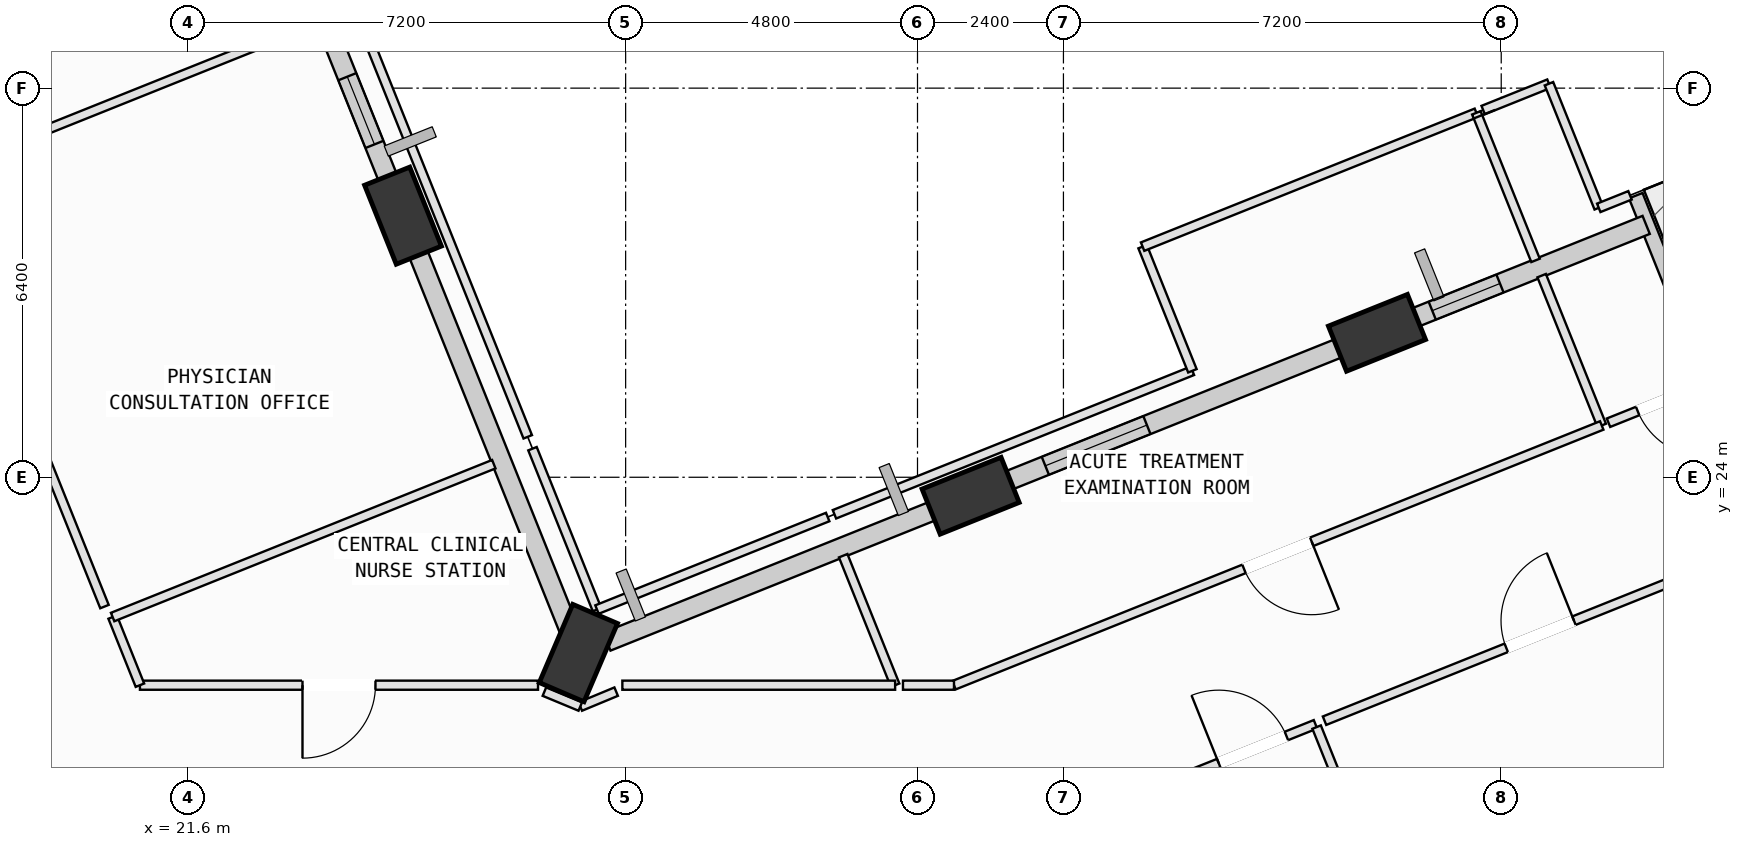
"""IFC4 building model, lengths in metres.
Left out: names, types, materials, properties, quantities, classifications, styles, units other than length and angle.
Written with IfcOpenShell. Run it as: python <this file> out.ifc"""

import sys

from ifc_helpers import new_model, si_unit, direction, frame, frame_2d, origin, origin_2d, place, context, subcontext, project, spatial, rectangle, extrude, element, fill, save


model = new_model("IFC4")
c1 = context("Model", 3, precision=1e-05, world=origin(), true_north=direction((0.0, 1.0)))
c2 = subcontext(c1, "Body", "Model", "MODEL_VIEW")
j1 = project(units=[si_unit("LENGTHUNIT", "METRE"), si_unit("PLANEANGLEUNIT", "RADIAN")], contexts=[c1])
p1 = place(None, origin())
s1 = spatial("IfcSite", under=j1, at=p1, CompositionType="ELEMENT")
p2 = place(p1, origin())
s2 = spatial("IfcBuilding", under=s1, at=p2, CompositionType="ELEMENT")
p3 = place(p2, frame((0.0, 0.0, 116.4)))
s3 = spatial("IfcBuildingStorey", under=s2, at=p3, CompositionType="ELEMENT", Elevation=116.4)
p4 = place(p3, frame((41.156, 26.375, 0.002), z_axis=(-0.006777640232, 0.031262628818, 0.999488224859), x_axis=(-0.828274350802, -0.560196266994, 0.011905555365)))
e1 = element("IfcColumn", 1, at=p4, inside=s3, PredefinedType="COLUMN", context=c2, shape_type="SweptSolid", body=[
    extrude(rectangle(XDim=1.4, YDim=0.8, at=origin_2d()), origin(), (0.0, 0.0, 1.0), 3.998),
])
p5 = place(p3, frame((34.474, 23.696, 0.002), z_axis=(0.004581752639, 0.003665402111, 0.999982786037), x_axis=(-0.870434976609, 0.492278562101, 0.002183756462)))
e2 = element("IfcColumn", 2, at=p5, inside=s3, PredefinedType="COLUMN", context=c2, shape_type="SweptSolid", body=[
    extrude(rectangle(XDim=1.4, YDim=0.8, at=origin_2d()), origin(), (0.0, 0.0, 1.0), 3.996),
])
p6 = place(p3, frame((28.023, 21.109, 0.002), z_axis=(0.015511177692, -0.022961428395, 0.999616014364), x_axis=(-0.188731248776, 0.981698205068, 0.025478420325)))
e3 = element("IfcColumn", 3, at=p6, inside=s3, PredefinedType="COLUMN", context=c2, shape_type="SweptSolid", body=[
    extrude(rectangle(XDim=1.4, YDim=0.8, at=origin_2d()), origin(), (0.0, 0.0, 1.0), 3.998),
])
p7 = place(p3, frame((25.139, 28.302, 0.002), z_axis=(-0.014223979667, -0.035163142868, 0.99928035695), x_axis=(0.002786671308, 0.999376185068, 0.035206181014)))
e4 = element("IfcColumn", 4, at=p7, inside=s3, PredefinedType="COLUMN", context=c2, shape_type="SweptSolid", body=[
    extrude(rectangle(XDim=1.4, YDim=0.8, at=origin_2d()), origin(), (0.0, 0.0, 1.0), 3.999),
])
p8 = place(p3, frame((45.413, 28.632, 0.0), z_axis=(0.0, 0.0, 1.0), x_axis=(0.372181923491, -0.928159800803, 0.0)))
e5 = element("IfcWall", 5, at=p8, inside=s3, PredefinedType="SOLIDWALL", context=c2, shape_type="SweptSolid", body=[
    extrude(rectangle(XDim=2.5, YDim=0.24, at=frame_2d((1.25, 0.0))), origin(), (0.0, 0.0, 1.0), 3.165),
])
p9 = place(p3, frame((41.623, 26.563, 0.0), z_axis=(0.0, 0.0, 1.0), x_axis=(0.928156727061, 0.372189588801, 0.0)))
e6 = element("IfcWall", 6, at=p9, inside=s3, PredefinedType="SOLIDWALL", context=c2, shape_type="SweptSolid", body=[
    extrude(rectangle(XDim=4.267, YDim=0.32, at=frame_2d((2.134, 0.0))), origin(), (0.0, 0.0, 1.0), 3.145),
])
p10 = place(p9, frame((0.477, 0.0, 0.75)))
e7 = element("IfcOpeningElement", 7, at=p10, cuts=e6, PredefinedType="OPENING", context=c2, shape_type="SweptSolid", body=[
    extrude(rectangle(XDim=1.2, YDim=1.75, at=frame_2d((0.6, 0.875))), frame((0.0, 0.17, 0.0), z_axis=(0.0, -1.0, 0.0), x_axis=(1.0, 0.0, 0.0)), (0.0, 0.0, 1.0), 0.34),
])
p11 = place(p3, frame((34.945, 23.885, 0.0), z_axis=(0.0, 0.0, 1.0), x_axis=(0.928167331389, 0.372163142912, 0.0)))
e8 = element("IfcWall", 8, at=p11, inside=s3, PredefinedType="SOLIDWALL", context=c2, shape_type="SweptSolid", body=[
    extrude(rectangle(XDim=6.211, YDim=0.32, at=frame_2d((3.105, 0.0))), origin(), (0.0, 0.0, 1.0), 3.165),
])
p12 = place(p11, frame((0.816, 0.0, 0.75)))
e9 = element("IfcOpeningElement", 9, at=p12, cuts=e8, PredefinedType="OPENING", context=c2, shape_type="SweptSolid", body=[
    extrude(rectangle(XDim=1.8, YDim=2.05, at=frame_2d((0.9, 1.025))), frame((0.0, 0.17, 0.0), z_axis=(0.0, -1.0, 0.0), x_axis=(1.0, 0.0, 0.0)), (0.0, 0.0, 1.0), 0.34),
])
p13 = place(p3, frame((28.492, 21.297, 0.0), z_axis=(0.0, 0.0, 1.0), x_axis=(0.928154282778, 0.372195684232, 0.0)))
e10 = element("IfcWall", 10, at=p13, inside=s3, PredefinedType="SOLIDWALL", context=c2, shape_type="SweptSolid", body=[
    extrude(rectangle(XDim=5.96, YDim=0.32, at=frame_2d((2.98, 0.0))), origin(), (0.0, 0.0, 1.0), 3.165),
])
p14 = place(p3, frame((25.343, 27.794, 0.0), z_axis=(0.0, 0.0, 1.0), x_axis=(0.37216889436, -0.928165025236, 0.0)))
e11 = element("IfcWall", 11, at=p14, inside=s3, PredefinedType="SOLIDWALL", context=c2, shape_type="SweptSolid", body=[
    extrude(rectangle(XDim=6.76, YDim=0.32, at=frame_2d((3.38, 0.0))), origin(), (0.0, 0.0, 1.0), 3.165),
])
p15 = place(p3, frame((22.659, 34.485, 0.0), z_axis=(0.0, 0.0, 1.0), x_axis=(0.372175226891, -0.928162486038, 0.0)))
e12 = element("IfcWall", 12, at=p15, inside=s3, PredefinedType="SOLIDWALL", context=c2, shape_type="SweptSolid", body=[
    extrude(rectangle(XDim=6.223, YDim=0.32, at=frame_2d((3.111, 0.0))), origin(), (0.0, 0.0, 1.0), 3.165),
])
p16 = place(p15, frame((4.199, 0.0, 0.75)))
e13 = element("IfcOpeningElement", 13, at=p16, cuts=e12, PredefinedType="OPENING", context=c2, shape_type="SweptSolid", body=[
    extrude(rectangle(XDim=1.2, YDim=1.75, at=frame_2d((0.6, 0.875))), frame((0.0, 0.17, 0.0), z_axis=(0.0, -1.0, 0.0), x_axis=(1.0, 0.0, 0.0)), (0.0, 0.0, 1.0), 0.34),
])
p17 = place(p15, frame((0.561, 0.0, 0.75)))
e14 = element("IfcOpeningElement", 14, at=p17, cuts=e12, PredefinedType="OPENING", context=c2, shape_type="SweptSolid", body=[
    extrude(rectangle(XDim=1.2, YDim=1.75, at=frame_2d((0.6, 0.875))), frame((0.0, 0.17, 0.0), z_axis=(0.0, -1.0, 0.0), x_axis=(1.0, 0.0, 0.0)), (0.0, 0.0, 1.0), 0.34),
])
p18 = place(p3, frame((38.076, 19.107, 0.0), z_axis=(0.0, 0.0, 1.0), x_axis=(0.928098589705, 0.372334537463, 0.0)))
e15 = element("IfcWall", 15, at=p18, inside=s3, PredefinedType="PARTITIONING", context=c2, shape_type="SweptSolid", body=[
    extrude(rectangle(XDim=2.229, YDim=0.15, at=frame_2d((1.115, 0.0))), origin(), (0.0, 0.0, 1.0), 2.945),
])
p19 = place(p18, frame((0.515, 0.0, 0.0)))
e16 = element("IfcOpeningElement", 16, at=p19, cuts=e15, PredefinedType="OPENING", context=c2, shape_type="SweptSolid", body=[
    extrude(rectangle(XDim=1.2, YDim=2.15, at=frame_2d((0.6, 1.075))), frame((0.0, 0.085, 0.0), z_axis=(0.0, -1.0, 0.0), x_axis=(1.0, 0.0, 0.0)), (0.0, 0.0, 1.0), 0.17),
])
p20 = place(p3, frame((40.164, 19.891, 0.0), z_axis=(0.0, 0.0, 1.0), x_axis=(0.372132851531, -0.928179476616, 0.0)))
e17 = element("IfcWall", 17, at=p20, inside=s3, PredefinedType="PARTITIONING", context=c2, shape_type="SweptSolid", body=[
    extrude(rectangle(XDim=15.481, YDim=0.15, at=frame_2d((7.74, 0.0))), origin(), (0.0, 0.0, 1.0), 3.78),
])
p21 = place(p3, frame((40.294, 19.996, 0.0), z_axis=(0.0, 0.0, 1.0), x_axis=(0.928134709593, 0.372244490689, 0.0)))
e18 = element("IfcWall", 18, at=p21, inside=s3, PredefinedType="PARTITIONING", context=c2, shape_type="SweptSolid", body=[
    extrude(rectangle(XDim=7.64, YDim=0.15, at=frame_2d((3.82, 0.0))), origin(), (0.0, 0.0, 1.0), 3.78),
])
p22 = place(p21, frame((3.22, 0.0, 0.0)))
e19 = element("IfcOpeningElement", 19, at=p22, cuts=e18, PredefinedType="OPENING", context=c2, shape_type="SweptSolid", body=[
    extrude(rectangle(XDim=1.2, YDim=2.15, at=frame_2d((0.6, 1.075))), frame((0.0, 0.085, 0.0), z_axis=(0.0, -1.0, 0.0), x_axis=(1.0, 0.0, 0.0)), (0.0, 0.0, 1.0), 0.17),
])
p23 = place(p3, frame((28.644, 20.474, 0.0), z_axis=(0.0, 0.0, 1.0), x_axis=(-0.923494633817, -0.383611341478, 0.0)))
e20 = element("IfcWall", 20, at=p23, inside=s3, PredefinedType="PARTITIONING", context=c2, shape_type="SweptSolid", body=[
    extrude(rectangle(XDim=0.639, YDim=0.15, at=frame_2d((0.319, 0.0))), origin(), (0.0, 0.0, 1.0), 3.78),
])
p24 = place(p3, frame((28.054, 20.229, 0.0), z_axis=(0.0, 0.0, 1.0), x_axis=(-0.923438377602, 0.38374674301, 0.0)))
e21 = element("IfcWall", 21, at=p24, inside=s3, PredefinedType="PARTITIONING", context=c2, shape_type="SweptSolid", body=[
    extrude(rectangle(XDim=0.639, YDim=0.15, at=frame_2d((0.319, 0.0))), origin(), (0.0, 0.0, 1.0), 3.78),
])
p25 = place(p3, frame((27.359, 20.58, 0.0), z_axis=(0.0, 0.0, 1.0), x_axis=(-1.0, 0.0, 0.0)))
e22 = element("IfcWall", 22, at=p25, inside=s3, PredefinedType="PARTITIONING", context=c2, shape_type="SweptSolid", body=[
    extrude(rectangle(XDim=6.547, YDim=0.15, at=frame_2d((3.273, 0.0))), origin(), (0.0, 0.0, 1.0), 3.78),
])
p26 = place(p25, frame((2.674, 0.0, 0.0)))
e23 = element("IfcOpeningElement", 23, at=p26, cuts=e22, PredefinedType="OPENING", context=c2, shape_type="SweptSolid", body=[
    extrude(rectangle(XDim=1.2, YDim=2.15, at=frame_2d((0.6, 1.075))), frame((0.0, 0.085, 0.0), z_axis=(0.0, -1.0, 0.0), x_axis=(1.0, 0.0, 0.0)), (0.0, 0.0, 1.0), 0.17),
])
p27 = place(p3, frame((20.812, 20.58, 0.0), z_axis=(0.0, 0.0, 1.0), x_axis=(-0.371843836614, 0.928295298476, 0.0)))
e24 = element("IfcWall", 24, at=p27, inside=s3, PredefinedType="PARTITIONING", context=c2, shape_type="SweptSolid", body=[
    extrude(rectangle(XDim=1.208, YDim=0.15, at=frame_2d((0.604, 0.0))), origin(), (0.0, 0.0, 1.0), 3.78),
])
p28 = place(p3, frame((20.363, 21.701, 0.0), z_axis=(0.0, 0.0, 1.0), x_axis=(0.928142281739, 0.372225610147, 0.0)))
e25 = element("IfcWall", 25, at=p28, inside=s3, PredefinedType="PARTITIONING", context=c2, shape_type="SweptSolid", body=[
    extrude(rectangle(XDim=6.754, YDim=0.15, at=frame_2d((3.377, 0.0))), origin(), (0.0, 0.0, 1.0), 3.78),
])
p29 = place(p3, frame((27.268, 24.47, 0.0), z_axis=(0.0, 0.0, 1.0), x_axis=(0.372187869695, -0.928157416418, 0.0)))
e26 = element("IfcWall", 26, at=p29, inside=s3, PredefinedType="PARTITIONING", context=c2, shape_type="SweptSolid", body=[
    extrude(rectangle(XDim=2.851, YDim=0.15, at=frame_2d((1.425, 0.0))), origin(), (0.0, 0.0, 1.0), 3.78),
])
p30 = place(p3, frame((28.329, 21.824, 0.0), z_axis=(0.0, 0.0, 1.0), x_axis=(0.928105529855, 0.372317237652, 0.0)))
e27 = element("IfcWall", 27, at=p30, inside=s3, PredefinedType="PARTITIONING", context=c2, shape_type="SweptSolid", body=[
    extrude(rectangle(XDim=4.088, YDim=0.15, at=frame_2d((2.044, 0.0))), origin(), (0.0, 0.0, 1.0), 3.78),
])
p31 = place(p3, frame((32.378, 22.71, 0.0), z_axis=(0.0, 0.0, 1.0), x_axis=(0.37216097697, -0.928168199854, 0.0)))
e28 = element("IfcWall", 28, at=p31, inside=s3, PredefinedType="PARTITIONING", context=c2, shape_type="SweptSolid", body=[
    extrude(rectangle(XDim=2.295, YDim=0.15, at=frame_2d((1.147, 0.0))), origin(), (0.0, 0.0, 1.0), 3.78),
])
p32 = place(p3, frame((33.232, 20.58, 0.0), z_axis=(0.0, 0.0, 1.0), x_axis=(-1.0, 0.0, 0.0)))
e29 = element("IfcWall", 29, at=p32, inside=s3, PredefinedType="PARTITIONING", context=c2, shape_type="SweptSolid", body=[
    extrude(rectangle(XDim=4.486, YDim=0.15, at=frame_2d((2.243, 0.0))), origin(), (0.0, 0.0, 1.0), 3.78),
])
p33 = place(p3, frame((32.234, 23.391, 0.0), z_axis=(0.0, 0.0, 1.0), x_axis=(0.928205670009, 0.37206751291, 0.0)))
e30 = element("IfcWall", 30, at=p33, inside=s3, PredefinedType="PARTITIONING", context=c2, shape_type="SweptSolid", body=[
    extrude(rectangle(XDim=6.343, YDim=0.15, at=frame_2d((3.171, 0.0))), origin(), (0.0, 0.0, 1.0), 3.78),
])
p34 = place(p3, frame((38.121, 25.751, 0.0), z_axis=(0.0, 0.0, 1.0), x_axis=(-0.372289706469, 0.928116573743, 0.0)))
e31 = element("IfcWall", 31, at=p34, inside=s3, PredefinedType="PARTITIONING", context=c2, shape_type="SweptSolid", body=[
    extrude(rectangle(XDim=2.2, YDim=0.15, at=frame_2d((1.1, 0.0))), origin(), (0.0, 0.0, 1.0), 3.78),
])
p35 = place(p3, frame((37.302, 27.793, 0.0), z_axis=(0.0, 0.0, 1.0), x_axis=(0.92816603235, 0.372166382673, 0.0)))
e32 = element("IfcWall", 32, at=p35, inside=s3, PredefinedType="PARTITIONING", context=c2, shape_type="SweptSolid", body=[
    extrude(rectangle(XDim=5.914, YDim=0.15, at=frame_2d((2.957, 0.0))), origin(), (0.0, 0.0, 1.0), 3.78),
])
p36 = place(p3, frame((42.791, 29.994, 0.0), z_axis=(0.0, 0.0, 1.0), x_axis=(0.372082805239, -0.928199539994, 0.0)))
e33 = element("IfcWall", 33, at=p36, inside=s3, PredefinedType="PARTITIONING", context=c2, shape_type="SweptSolid", body=[
    extrude(rectangle(XDim=2.615, YDim=0.15, at=frame_2d((1.307, 0.0))), origin(), (0.0, 0.0, 1.0), 3.78),
])
p37 = place(p3, frame((43.865, 27.316, 0.0), z_axis=(0.0, 0.0, 1.0), x_axis=(0.372199229905, -0.928152860933, 0.0)))
e34 = element("IfcWall", 34, at=p37, inside=s3, PredefinedType="PARTITIONING", context=c2, shape_type="SweptSolid", body=[
    extrude(rectangle(XDim=2.655, YDim=0.15, at=frame_2d((1.327, 0.0))), origin(), (0.0, 0.0, 1.0), 3.78),
])
p38 = place(p3, frame((44.853, 24.852, 0.0), z_axis=(0.0, 0.0, 1.0), x_axis=(-0.928153610166, -0.372197361537, 0.0)))
e35 = element("IfcWall", 35, at=p38, inside=s3, PredefinedType="PARTITIONING", context=c2, shape_type="SweptSolid", body=[
    extrude(rectangle(XDim=11.478, YDim=0.15, at=frame_2d((5.739, 0.0))), origin(), (0.0, 0.0, 1.0), 2.945),
])
p39 = place(p38, frame((5.139, 0.0, 0.0)))
e36 = element("IfcOpeningElement", 36, at=p39, cuts=e35, PredefinedType="OPENING", context=c2, shape_type="SweptSolid", body=[
    extrude(rectangle(XDim=1.2, YDim=2.15, at=frame_2d((0.6, 1.075))), frame((0.0, 0.085, 0.0), z_axis=(0.0, -1.0, 0.0), x_axis=(1.0, 0.0, 0.0)), (0.0, 0.0, 1.0), 0.17),
])
p40 = place(p3, frame((34.2, 20.58, 0.0), z_axis=(0.0, 0.0, 1.0), x_axis=(-1.0, 0.0, 0.0)))
e37 = element("IfcWall", 37, at=p40, inside=s3, PredefinedType="PARTITIONING", context=c2, shape_type="SweptSolid", body=[
    extrude(rectangle(XDim=0.839, YDim=0.15, at=frame_2d((0.419, 0.0))), origin(), (0.0, 0.0, 1.0), 3.78),
])
p41 = place(p3, frame((49.342, 26.652, 0.0), z_axis=(0.0, 0.0, 1.0), x_axis=(-0.928187259022, -0.372113439946, 0.0)))
e38 = element("IfcWall", 38, at=p41, inside=s3, PredefinedType="PARTITIONING", context=c2, shape_type="SweptSolid", body=[
    extrude(rectangle(XDim=4.717, YDim=0.15, at=frame_2d((2.358, 0.0))), origin(), (0.0, 0.0, 1.0), 2.945),
])
p42 = place(p41, frame((3.0, 0.0, 0.0)))
e39 = element("IfcOpeningElement", 39, at=p42, cuts=e38, PredefinedType="OPENING", context=c2, shape_type="SweptSolid", body=[
    extrude(rectangle(XDim=1.2, YDim=2.15, at=frame_2d((0.6, 1.075))), frame((0.0, 0.085, 0.0), z_axis=(0.0, -1.0, 0.0), x_axis=(1.0, 0.0, 0.0)), (0.0, 0.0, 1.0), 0.17),
])
p43 = place(p3, frame((42.903, 30.039, 0.0), z_axis=(0.0, 0.0, 1.0), x_axis=(0.928173075603, 0.372148816639, 0.0)))
e40 = element("IfcWall", 40, at=p43, inside=s3, PredefinedType="PARTITIONING", context=c2, shape_type="SweptSolid", body=[
    extrude(rectangle(XDim=1.166, YDim=0.15, at=frame_2d((0.583, 0.0))), origin(), (0.0, 0.0, 1.0), 3.78),
])
p44 = place(p3, frame((43.985, 30.473, 0.0), z_axis=(0.0, 0.0, 1.0), x_axis=(0.372194114706, -0.928154912166, 0.0)))
e41 = element("IfcWall", 41, at=p44, inside=s3, PredefinedType="PARTITIONING", context=c2, shape_type="SweptSolid", body=[
    extrude(rectangle(XDim=2.2, YDim=0.15, at=frame_2d((1.1, 0.0))), origin(), (0.0, 0.0, 1.0), 3.78),
])
p45 = place(p3, frame((44.804, 28.431, 0.0), z_axis=(0.0, 0.0, 1.0), x_axis=(0.928233315821, 0.371998536825, 0.0)))
e42 = element("IfcWall", 42, at=p45, inside=s3, PredefinedType="PARTITIONING", context=c2, shape_type="SweptSolid", body=[
    extrude(rectangle(XDim=0.554, YDim=0.15, at=frame_2d((0.277, 0.0))), origin(), (0.0, 0.0, 1.0), 3.145),
])
p46 = place(p3, frame((20.229, 21.873, 0.0), z_axis=(0.0, 0.0, 1.0), x_axis=(-0.372211937798, 0.928147764831, 0.0)))
e43 = element("IfcWall", 43, at=p46, inside=s3, PredefinedType="PARTITIONING", context=c2, shape_type="SweptSolid", body=[
    extrude(rectangle(XDim=7.635, YDim=0.15, at=frame_2d((3.818, 0.0))), origin(), (0.0, 0.0, 1.0), 3.78),
])
p47 = place(p46, frame((3.218, 0.0, 0.0)))
e44 = element("IfcOpeningElement", 44, at=p47, cuts=e43, PredefinedType="OPENING", context=c2, shape_type="SweptSolid", body=[
    extrude(rectangle(XDim=1.2, YDim=2.15, at=frame_2d((0.6, 1.075))), frame((0.0, 0.085, 0.0), z_axis=(0.0, -1.0, 0.0), x_axis=(1.0, 0.0, 0.0)), (0.0, 0.0, 1.0), 0.17),
])
p48 = place(p3, frame((17.387, 28.96, 0.0), z_axis=(0.0, 0.0, 1.0), x_axis=(0.928184887564, 0.372119355178, 0.0)))
e45 = element("IfcWall", 45, at=p48, inside=s3, PredefinedType="PARTITIONING", context=c2, shape_type="SweptSolid", body=[
    extrude(rectangle(XDim=6.815, YDim=0.15, at=frame_2d((3.408, 0.0))), origin(), (0.0, 0.0, 1.0), 3.78),
])
p49 = place(p3, frame((24.348, 31.751, 0.0), z_axis=(0.0, 0.0, 1.0), x_axis=(0.372256126865, -0.928130042619, 0.0)))
e46 = element("IfcWall", 46, at=p49, inside=s3, PredefinedType="PARTITIONING", context=c2, shape_type="SweptSolid", body=[
    extrude(rectangle(XDim=7.635, YDim=0.15, at=frame_2d((3.817, 0.0))), origin(), (0.0, 0.0, 1.0), 3.78),
])
p50 = place(p10, origin())
e47 = element("IfcWindow", 47, at=p50, inside=s3, PartitioningType="SINGLE_PANEL", PredefinedType="WINDOW", context=c2, shape_type="SweptSolid", body=[
    extrude(rectangle(XDim=1.2, YDim=1.75, at=frame_2d((0.6, 0.875))), frame((0.0, 0.03, 0.0), z_axis=(0.0, -1.0, 0.0), x_axis=(1.0, 0.0, 0.0)), (0.0, 0.0, 1.0), 0.06),
])
fill(e7, e47)
p51 = place(p12, origin())
e48 = element("IfcWindow", 48, at=p51, inside=s3, PartitioningType="SINGLE_PANEL", PredefinedType="WINDOW", context=c2, shape_type="SweptSolid", body=[
    extrude(rectangle(XDim=1.8, YDim=2.05, at=frame_2d((0.9, 1.025))), frame((0.0, 0.03, 0.0), z_axis=(0.0, -1.0, 0.0), x_axis=(1.0, 0.0, 0.0)), (0.0, 0.0, 1.0), 0.06),
])
fill(e9, e48)
p52 = place(p16, origin())
e49 = element("IfcWindow", 49, at=p52, inside=s3, PartitioningType="SINGLE_PANEL", PredefinedType="WINDOW", context=c2, shape_type="SweptSolid", body=[
    extrude(rectangle(XDim=1.2, YDim=1.75, at=frame_2d((0.6, 0.875))), frame((0.0, 0.03, 0.0), z_axis=(0.0, -1.0, 0.0), x_axis=(1.0, 0.0, 0.0)), (0.0, 0.0, 1.0), 0.06),
])
fill(e13, e49)
p53 = place(p19, origin())
e50 = element("IfcDoor", 50, at=p53, inside=s3, OperationType="SINGLE_SWING_LEFT", PredefinedType="DOOR", context=c2, shape_type="SweptSolid", body=[
    extrude(rectangle(XDim=1.2, YDim=2.15, at=frame_2d((0.6, 1.075))), frame((0.0, 0.025, 0.0), z_axis=(0.0, -1.0, 0.0), x_axis=(1.0, 0.0, 0.0)), (0.0, 0.0, 1.0), 0.05),
])
fill(e16, e50)
p54 = place(p22, origin())
e51 = element("IfcDoor", 51, at=p54, inside=s3, OperationType="SINGLE_SWING_RIGHT", PredefinedType="DOOR", context=c2, shape_type="SweptSolid", body=[
    extrude(rectangle(XDim=1.2, YDim=2.15, at=frame_2d((0.6, 1.075))), frame((0.0, 0.025, 0.0), z_axis=(0.0, -1.0, 0.0), x_axis=(1.0, 0.0, 0.0)), (0.0, 0.0, 1.0), 0.05),
])
fill(e19, e51)
p55 = place(p26, origin())
e52 = element("IfcDoor", 52, at=p55, inside=s3, OperationType="SINGLE_SWING_RIGHT", PredefinedType="DOOR", context=c2, shape_type="SweptSolid", body=[
    extrude(rectangle(XDim=1.2, YDim=2.15, at=frame_2d((0.6, 1.075))), frame((0.0, 0.025, 0.0), z_axis=(0.0, -1.0, 0.0), x_axis=(1.0, 0.0, 0.0)), (0.0, 0.0, 1.0), 0.05),
])
fill(e23, e52)
p56 = place(p39, origin())
e53 = element("IfcDoor", 53, at=p56, inside=s3, OperationType="SINGLE_SWING_LEFT", PredefinedType="DOOR", context=c2, shape_type="SweptSolid", body=[
    extrude(rectangle(XDim=1.2, YDim=2.15, at=frame_2d((0.6, 1.075))), frame((0.0, 0.025, 0.0), z_axis=(0.0, -1.0, 0.0), x_axis=(1.0, 0.0, 0.0)), (0.0, 0.0, 1.0), 0.05),
])
fill(e36, e53)
p57 = place(p42, origin())
e54 = element("IfcDoor", 54, at=p57, inside=s3, OperationType="SINGLE_SWING_LEFT", PredefinedType="DOOR", context=c2, shape_type="SweptSolid", body=[
    extrude(rectangle(XDim=1.2, YDim=2.15, at=frame_2d((0.6, 1.075))), frame((0.0, 0.025, 0.0), z_axis=(0.0, -1.0, 0.0), x_axis=(1.0, 0.0, 0.0)), (0.0, 0.0, 1.0), 0.05),
])
fill(e39, e54)
save(model, sys.argv[1])
